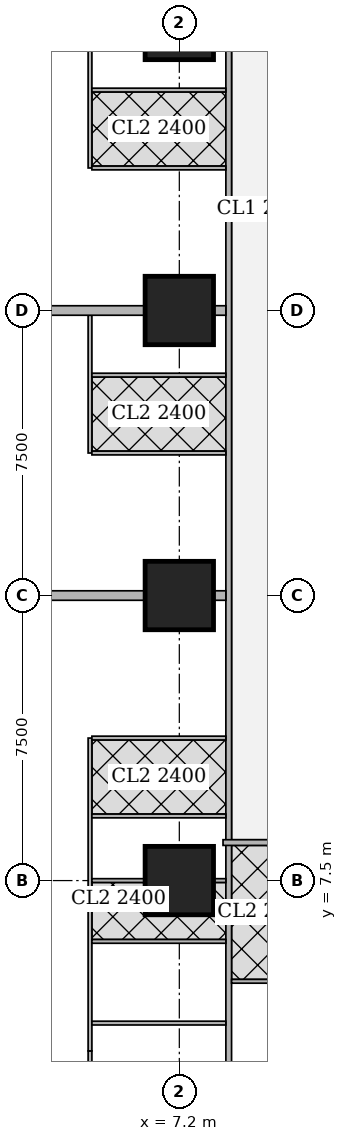
"""IFC4 building model, lengths in metres.
Left out: names, types, materials, properties, quantities, classifications, styles, units other than length and angle.
Written with IfcOpenShell. Run it as: python <this file> out.ifc"""

import sys

from ifc_helpers import new_model, si_unit, direction, frame, frame_2d, origin, origin_2d, place, context, subcontext, project, spatial, rectangle, extrude, element, fill, save


model = new_model("IFC4")
c1 = context("Model", 3, precision=1e-05, world=origin(), true_north=direction((0.0, 1.0)))
c2 = subcontext(c1, "Body", "Model", "MODEL_VIEW")
j1 = project(units=[si_unit("LENGTHUNIT", "METRE"), si_unit("PLANEANGLEUNIT", "RADIAN")], contexts=[c1])
p1 = place(None, origin())
s1 = spatial("IfcSite", under=j1, at=p1, CompositionType="ELEMENT")
p2 = place(p1, origin())
s2 = spatial("IfcBuilding", under=s1, at=p2, CompositionType="ELEMENT")
p3 = place(p2, frame((0.0, 0.0, 42.5)))
s3 = spatial("IfcBuildingStorey", under=s2, at=p3, CompositionType="ELEMENT", Elevation=42.5)
for number, where, z_axis, x_axis in (
    (1, (7.2, 7.5, 0.0), (0.0, 0.0, 1.0), (1.0, 0.0, 0.0)),
    (2, (7.2, 15.0, 0.0), (0.0, 0.0, 1.0), (1.0, 0.0, 0.0)),
    (3, (7.2, 22.5, 0.0), (0.0, 0.0, 1.0), (1.0, 0.0, 0.0)),
    (4, (7.2, 30.0, 0.0), (0.0, 0.0, 1.0), (1.0, 0.0, 0.0)),
):
    element("IfcColumn", number, at=place(p3, frame(where, z_axis=z_axis, x_axis=x_axis)), inside=s3, PredefinedType="COLUMN", context=c2, shape_type="SweptSolid", body=[
        extrude(rectangle(XDim=1.8, YDim=1.8, at=origin_2d()), origin(), (0.0, 0.0, 1.0), 3.75),
    ])
p4 = place(p3, frame((8.5, 2.426, 0.0), z_axis=(0.0, 0.0, 1.0), x_axis=(0.0, 1.0, 0.0)))
e5 = element("IfcWall", 5, at=p4, inside=s3, PredefinedType="SOLIDWALL", context=c2, shape_type="SweptSolid", body=[
    extrude(rectangle(XDim=40.173, YDim=0.15, at=frame_2d((20.086, 0.0))), origin(), (0.0, 0.0, 1.0), 3.5),
])
p5 = place(p4, frame((9.986, 0.0, 0.0)))
e6 = element("IfcOpeningElement", 6, at=p5, cuts=e5, PredefinedType="OPENING", context=c2, shape_type="SweptSolid", body=[
    extrude(rectangle(XDim=1.0, YDim=2.1, at=frame_2d((0.5, 1.05))), frame((0.0, 0.085, 0.0), z_axis=(0.0, -1.0, 0.0), x_axis=(1.0, 0.0, 0.0)), (0.0, 0.0, 1.0), 0.17),
])
p6 = place(p4, frame((14.161, 0.0, 0.0)))
e7 = element("IfcOpeningElement", 7, at=p6, cuts=e5, PredefinedType="OPENING", context=c2, shape_type="SweptSolid", body=[
    extrude(rectangle(XDim=1.0, YDim=2.1, at=frame_2d((0.5, 1.05))), frame((0.0, 0.085, 0.0), z_axis=(0.0, -1.0, 0.0), x_axis=(1.0, 0.0, 0.0)), (0.0, 0.0, 1.0), 0.17),
])
p7 = place(p4, frame((21.662, 0.0, 0.0)))
e8 = element("IfcOpeningElement", 8, at=p7, cuts=e5, PredefinedType="OPENING", context=c2, shape_type="SweptSolid", body=[
    extrude(rectangle(XDim=1.0, YDim=2.1, at=frame_2d((0.5, 1.05))), frame((0.0, 0.085, 0.0), z_axis=(0.0, -1.0, 0.0), x_axis=(1.0, 0.0, 0.0)), (0.0, 0.0, 1.0), 0.17),
])
p8 = place(p4, frame((29.161, 0.0, 0.0)))
e9 = element("IfcOpeningElement", 9, at=p8, cuts=e5, PredefinedType="OPENING", context=c2, shape_type="SweptSolid", body=[
    extrude(rectangle(XDim=1.0, YDim=2.1, at=frame_2d((0.5, 1.05))), frame((0.0, 0.085, 0.0), z_axis=(0.0, -1.0, 0.0), x_axis=(1.0, 0.0, 0.0)), (0.0, 0.0, 1.0), 0.17),
])
p9 = place(p3, frame((40.054, 8.5, 0.0), z_axis=(0.0, 0.0, 1.0), x_axis=(-1.0, 0.0, 0.0)))
e10 = element("IfcWall", 10, at=p9, inside=s3, PredefinedType="SOLIDWALL", context=c2, shape_type="SweptSolid", body=[
    extrude(rectangle(XDim=31.704, YDim=0.15, at=frame_2d((15.852, 0.0))), origin(), (0.0, 0.0, 1.0), 3.5),
])
p10 = place(p9, frame((27.321, 0.0, 0.0)))
e11 = element("IfcOpeningElement", 11, at=p10, cuts=e10, PredefinedType="OPENING", context=c2, shape_type="SweptSolid", body=[
    extrude(rectangle(XDim=1.0, YDim=2.1, at=frame_2d((0.5, 1.05))), frame((0.0, 0.085, 0.0), z_axis=(0.0, -1.0, 0.0), x_axis=(1.0, 0.0, 0.0)), (0.0, 0.0, 1.0), 0.17),
])
p11 = place(p9, frame((23.054, 0.0, 0.0)))
e12 = element("IfcOpeningElement", 12, at=p11, cuts=e10, PredefinedType="OPENING", context=c2, shape_type="SweptSolid", body=[
    extrude(rectangle(XDim=1.0, YDim=2.1, at=frame_2d((0.5, 1.05))), frame((0.0, 0.085, 0.0), z_axis=(0.0, -1.0, 0.0), x_axis=(1.0, 0.0, 0.0)), (0.0, 0.0, 1.0), 0.17),
])
p12 = place(p9, frame((15.854, 0.0, 0.0)))
e13 = element("IfcOpeningElement", 13, at=p12, cuts=e10, PredefinedType="OPENING", context=c2, shape_type="SweptSolid", body=[
    extrude(rectangle(XDim=1.0, YDim=2.1, at=frame_2d((0.5, 1.05))), frame((0.0, 0.085, 0.0), z_axis=(0.0, -1.0, 0.0), x_axis=(1.0, 0.0, 0.0)), (0.0, 0.0, 1.0), 0.17),
])
p13 = place(p9, frame((8.654, 0.0, 0.0)))
e14 = element("IfcOpeningElement", 14, at=p13, cuts=e10, PredefinedType="OPENING", context=c2, shape_type="SweptSolid", body=[
    extrude(rectangle(XDim=1.0, YDim=2.1, at=frame_2d((0.5, 1.05))), frame((0.0, 0.085, 0.0), z_axis=(0.0, -1.0, 0.0), x_axis=(1.0, 0.0, 0.0)), (0.0, 0.0, 1.0), 0.17),
])
p14 = place(p9, frame((0.15, 0.0, 0.0)))
e15 = element("IfcOpeningElement", 15, at=p14, cuts=e10, PredefinedType="OPENING", context=c2, shape_type="SweptSolid", body=[
    extrude(rectangle(XDim=1.0, YDim=2.1, at=frame_2d((0.5, 1.05))), frame((0.0, 0.085, 0.0), z_axis=(0.0, -1.0, 0.0), x_axis=(1.0, 0.0, 0.0)), (0.0, 0.0, 1.0), 0.17),
])
p15 = place(p3, frame((4.85, 0.121, 0.0), z_axis=(0.0, 0.0, 1.0), x_axis=(0.0, 1.0, 0.0)))
e16 = element("IfcWall", 16, at=p15, inside=s3, PredefinedType="PARTITIONING", context=c2, shape_type="SweptSolid", body=[
    extrude(rectangle(XDim=2.897, YDim=0.1, at=frame_2d((1.448, 0.0))), origin(), (0.0, 0.0, 1.0), 2.05),
])
p16 = place(p3, frame((4.85, 3.018, 0.0), z_axis=(0.0, 0.0, 1.0), x_axis=(0.0, 1.0, 0.0)))
e17 = element("IfcWall", 17, at=p16, inside=s3, PredefinedType="PARTITIONING", context=c2, shape_type="SweptSolid", body=[
    extrude(rectangle(XDim=8.232, YDim=0.1, at=frame_2d((4.116, 0.0))), origin(), (0.0, 0.0, 1.0), 3.5),
])
p17 = place(p16, frame((6.757, 0.0, 0.0)))
e18 = element("IfcOpeningElement", 18, at=p17, cuts=e17, PredefinedType="OPENING", context=c2, shape_type="SweptSolid", body=[
    extrude(rectangle(XDim=0.9, YDim=2.1, at=frame_2d((0.45, 1.05))), frame((0.0, 0.06, 0.0), z_axis=(0.0, -1.0, 0.0), x_axis=(1.0, 0.0, 0.0)), (0.0, 0.0, 1.0), 0.12),
])
p18 = place(p16, frame((3.232, 0.0, 0.0)))
e19 = element("IfcOpeningElement", 19, at=p18, cuts=e17, PredefinedType="OPENING", context=c2, shape_type="SweptSolid", body=[
    extrude(rectangle(XDim=0.9, YDim=2.1, at=frame_2d((0.45, 1.05))), frame((0.0, 0.06, 0.0), z_axis=(0.0, -1.0, 0.0), x_axis=(1.0, 0.0, 0.0)), (0.0, 0.0, 1.0), 0.12),
])
p19 = place(p16, frame((4.882, 0.0, 0.0)))
e20 = element("IfcOpeningElement", 20, at=p19, cuts=e17, PredefinedType="OPENING", context=c2, shape_type="SweptSolid", body=[
    extrude(rectangle(XDim=0.9, YDim=2.1, at=frame_2d((0.45, 1.05))), frame((0.0, 0.06, 0.0), z_axis=(0.0, -1.0, 0.0), x_axis=(1.0, 0.0, 0.0)), (0.0, 0.0, 1.0), 0.12),
])
p20 = place(p16, frame((1.357, 0.0, 0.0)))
e21 = element("IfcOpeningElement", 21, at=p20, cuts=e17, PredefinedType="OPENING", context=c2, shape_type="SweptSolid", body=[
    extrude(rectangle(XDim=0.9, YDim=2.1, at=frame_2d((0.45, 1.05))), frame((0.0, 0.06, 0.0), z_axis=(0.0, -1.0, 0.0), x_axis=(1.0, 0.0, 0.0)), (0.0, 0.0, 1.0), 0.12),
])
p21 = place(p3, frame((4.9, 3.75, 0.0), z_axis=(0.0, 0.0, 1.0), x_axis=(1.0, 0.0, 0.0)))
e22 = element("IfcWall", 22, at=p21, inside=s3, PredefinedType="PARTITIONING", context=c2, shape_type="SweptSolid", body=[
    extrude(rectangle(XDim=3.525, YDim=0.1, at=frame_2d((1.763, 0.0))), origin(), (0.0, 0.0, 1.0), 3.5),
])
p22 = place(p3, frame((4.9, 7.5, 0.0), z_axis=(0.0, 0.0, 1.0), x_axis=(1.0, 0.0, 0.0)))
e23 = element("IfcWall", 23, at=p22, inside=s3, PredefinedType="PARTITIONING", context=c2, shape_type="SweptSolid", body=[
    extrude(rectangle(XDim=1.399, YDim=0.1, at=frame_2d((0.7, 0.0))), origin(), (0.0, 0.0, 1.0), 3.5),
])
p23 = place(p3, frame((8.101, 7.5, 0.0), z_axis=(0.0, 0.0, 1.0), x_axis=(1.0, 0.0, 0.0)))
e24 = element("IfcWall", 24, at=p23, inside=s3, PredefinedType="PARTITIONING", context=c2, shape_type="SweptSolid", body=[
    extrude(rectangle(XDim=0.324, YDim=0.1, at=frame_2d((0.162, 0.0))), origin(), (0.0, 0.0, 1.0), 3.5),
])
for number, where, z_axis, x_axis in (
    (25, (4.9, 11.25, 0.0), (0.0, 0.0, 1.0), (1.0, 0.0, 0.0)),
    (26, (4.9, 9.2, 0.0), (0.0, 0.0, 1.0), (1.0, 0.0, 0.0)),
    (27, (4.9, 5.9, 0.0), (0.0, 0.0, 1.0), (1.0, 0.0, 0.0)),
):
    element("IfcWall", number, at=place(p3, frame(where, z_axis=z_axis, x_axis=x_axis)), inside=s3, PredefinedType="PARTITIONING", context=c2, shape_type="SweptSolid", body=[
        extrude(rectangle(XDim=3.525, YDim=0.1, at=frame_2d((1.763, 0.0))), origin(), (0.0, 0.0, 1.0), 3.5),
    ])
p24 = place(p3, frame((4.85, 18.75, 0.0), z_axis=(0.0, 0.0, 1.0), x_axis=(0.0, 1.0, 0.0)))
e28 = element("IfcWall", 28, at=p24, inside=s3, PredefinedType="PARTITIONING", context=c2, shape_type="SweptSolid", body=[
    extrude(rectangle(XDim=3.625, YDim=0.1, at=frame_2d((1.812, 0.0))), origin(), (0.0, 0.0, 1.0), 3.5),
])
p25 = place(p24, frame((0.575, 0.0, 0.0)))
e29 = element("IfcOpeningElement", 29, at=p25, cuts=e28, PredefinedType="OPENING", context=c2, shape_type="SweptSolid", body=[
    extrude(rectangle(XDim=0.9, YDim=2.1, at=frame_2d((0.45, 1.05))), frame((0.0, 0.06, 0.0), z_axis=(0.0, -1.0, 0.0), x_axis=(1.0, 0.0, 0.0)), (0.0, 0.0, 1.0), 0.12),
])
p26 = place(p24, frame((2.45, 0.0, 0.0)))
e30 = element("IfcOpeningElement", 30, at=p26, cuts=e28, PredefinedType="OPENING", context=c2, shape_type="SweptSolid", body=[
    extrude(rectangle(XDim=0.9, YDim=2.1, at=frame_2d((0.45, 1.05))), frame((0.0, 0.06, 0.0), z_axis=(0.0, -1.0, 0.0), x_axis=(1.0, 0.0, 0.0)), (0.0, 0.0, 1.0), 0.12),
])
for number, where, z_axis, x_axis in (
    (31, (4.9, 18.75, 0.0), (0.0, 0.0, 1.0), (1.0, 0.0, 0.0)),
    (32, (4.9, 20.8, 0.0), (0.0, 0.0, 1.0), (1.0, 0.0, 0.0)),
):
    element("IfcWall", number, at=place(p3, frame(where, z_axis=z_axis, x_axis=x_axis)), inside=s3, PredefinedType="PARTITIONING", context=c2, shape_type="SweptSolid", body=[
        extrude(rectangle(XDim=3.525, YDim=0.1, at=frame_2d((1.763, 0.0))), origin(), (0.0, 0.0, 1.0), 3.5),
    ])
p27 = place(p3, frame((3.65, 15.0, 0.0), z_axis=(0.0, 0.0, 1.0), x_axis=(1.0, 0.0, 0.0)))
e33 = element("IfcWall", 33, at=p27, inside=s3, PredefinedType="SOLIDWALL", context=c2, shape_type="SweptSolid", body=[
    extrude(rectangle(XDim=2.649, YDim=0.25, at=frame_2d((1.325, 0.0))), origin(), (0.0, 0.0, 1.0), 3.5),
])
p28 = place(p3, frame((8.101, 15.0, 0.0), z_axis=(0.0, 0.0, 1.0), x_axis=(1.0, 0.0, 0.0)))
e34 = element("IfcWall", 34, at=p28, inside=s3, PredefinedType="SOLIDWALL", context=c2, shape_type="SweptSolid", body=[
    extrude(rectangle(XDim=0.324, YDim=0.25, at=frame_2d((0.162, 0.0))), origin(), (0.0, 0.0, 1.0), 3.5),
])
p29 = place(p3, frame((4.85, 26.25, 0.0), z_axis=(0.0, 0.0, 1.0), x_axis=(0.0, 1.0, 0.0)))
e35 = element("IfcWall", 35, at=p29, inside=s3, PredefinedType="PARTITIONING", context=c2, shape_type="SweptSolid", body=[
    extrude(rectangle(XDim=3.625, YDim=0.1, at=frame_2d((1.812, 0.0))), origin(), (0.0, 0.0, 1.0), 3.5),
])
p30 = place(p29, frame((0.575, 0.0, 0.0)))
e36 = element("IfcOpeningElement", 36, at=p30, cuts=e35, PredefinedType="OPENING", context=c2, shape_type="SweptSolid", body=[
    extrude(rectangle(XDim=0.9, YDim=2.1, at=frame_2d((0.45, 1.05))), frame((0.0, 0.06, 0.0), z_axis=(0.0, -1.0, 0.0), x_axis=(1.0, 0.0, 0.0)), (0.0, 0.0, 1.0), 0.12),
])
p31 = place(p29, frame((2.45, 0.0, 0.0)))
e37 = element("IfcOpeningElement", 37, at=p31, cuts=e35, PredefinedType="OPENING", context=c2, shape_type="SweptSolid", body=[
    extrude(rectangle(XDim=0.9, YDim=2.1, at=frame_2d((0.45, 1.05))), frame((0.0, 0.06, 0.0), z_axis=(0.0, -1.0, 0.0), x_axis=(1.0, 0.0, 0.0)), (0.0, 0.0, 1.0), 0.12),
])
for number, where, z_axis, x_axis in (
    (38, (4.9, 26.25, 0.0), (0.0, 0.0, 1.0), (1.0, 0.0, 0.0)),
    (39, (4.9, 28.3, 0.0), (0.0, 0.0, 1.0), (1.0, 0.0, 0.0)),
):
    element("IfcWall", number, at=place(p3, frame(where, z_axis=z_axis, x_axis=x_axis)), inside=s3, PredefinedType="PARTITIONING", context=c2, shape_type="SweptSolid", body=[
        extrude(rectangle(XDim=3.525, YDim=0.1, at=frame_2d((1.763, 0.0))), origin(), (0.0, 0.0, 1.0), 3.5),
    ])
p32 = place(p3, frame((3.65, 22.5, 0.0), z_axis=(0.0, 0.0, 1.0), x_axis=(1.0, 0.0, 0.0)))
e40 = element("IfcWall", 40, at=p32, inside=s3, PredefinedType="SOLIDWALL", context=c2, shape_type="SweptSolid", body=[
    extrude(rectangle(XDim=2.649, YDim=0.25, at=frame_2d((1.325, 0.0))), origin(), (0.0, 0.0, 1.0), 3.5),
])
p33 = place(p3, frame((8.101, 22.5, 0.0), z_axis=(0.0, 0.0, 1.0), x_axis=(1.0, 0.0, 0.0)))
e41 = element("IfcWall", 41, at=p33, inside=s3, PredefinedType="SOLIDWALL", context=c2, shape_type="SweptSolid", body=[
    extrude(rectangle(XDim=0.324, YDim=0.25, at=frame_2d((0.162, 0.0))), origin(), (0.0, 0.0, 1.0), 3.5),
])
p34 = place(p3, frame((10.39, 4.85, 0.0), z_axis=(0.0, 0.0, 1.0), x_axis=(-1.0, 0.0, 0.0)))
e42 = element("IfcWall", 42, at=p34, inside=s3, PredefinedType="PARTITIONING", context=c2, shape_type="SweptSolid", body=[
    extrude(rectangle(XDim=1.815, YDim=0.1, at=frame_2d((0.907, 0.0))), origin(), (0.0, 0.0, 1.0), 3.5),
])
p35 = place(p34, frame((0.49, 0.0, 0.0)))
e43 = element("IfcOpeningElement", 43, at=p35, cuts=e42, PredefinedType="OPENING", context=c2, shape_type="SweptSolid", body=[
    extrude(rectangle(XDim=0.9, YDim=2.1, at=frame_2d((0.45, 1.05))), frame((0.0, 0.06, 0.0), z_axis=(0.0, -1.0, 0.0), x_axis=(1.0, 0.0, 0.0)), (0.0, 0.0, 1.0), 0.12),
])
p36 = place(p17, origin())
e44 = element("IfcDoor", 44, at=p36, inside=s3, OperationType="SINGLE_SWING_LEFT", PredefinedType="DOOR", context=c2, shape_type="SweptSolid", body=[
    extrude(rectangle(XDim=0.9, YDim=2.1, at=frame_2d((0.45, 1.05))), frame((0.0, 0.025, 0.0), z_axis=(0.0, -1.0, 0.0), x_axis=(1.0, 0.0, 0.0)), (0.0, 0.0, 1.0), 0.05),
])
fill(e18, e44)
p37 = place(p18, origin())
e45 = element("IfcDoor", 45, at=p37, inside=s3, OperationType="SINGLE_SWING_LEFT", PredefinedType="DOOR", context=c2, shape_type="SweptSolid", body=[
    extrude(rectangle(XDim=0.9, YDim=2.1, at=frame_2d((0.45, 1.05))), frame((0.0, 0.025, 0.0), z_axis=(0.0, -1.0, 0.0), x_axis=(1.0, 0.0, 0.0)), (0.0, 0.0, 1.0), 0.05),
])
fill(e19, e45)
p38 = place(p19, origin())
e46 = element("IfcDoor", 46, at=p38, inside=s3, OperationType="SINGLE_SWING_LEFT", PredefinedType="DOOR", context=c2, shape_type="SweptSolid", body=[
    extrude(rectangle(XDim=0.9, YDim=2.1, at=frame_2d((0.45, 1.05))), frame((0.0, 0.025, 0.0), z_axis=(0.0, -1.0, 0.0), x_axis=(1.0, 0.0, 0.0)), (0.0, 0.0, 1.0), 0.05),
])
fill(e20, e46)
p39 = place(p20, origin())
e47 = element("IfcDoor", 47, at=p39, inside=s3, OperationType="SINGLE_SWING_RIGHT", PredefinedType="DOOR", context=c2, shape_type="SweptSolid", body=[
    extrude(rectangle(XDim=0.9, YDim=2.1, at=frame_2d((0.45, 1.05))), frame((0.0, 0.025, 0.0), z_axis=(0.0, -1.0, 0.0), x_axis=(1.0, 0.0, 0.0)), (0.0, 0.0, 1.0), 0.05),
])
fill(e21, e47)
p40 = place(p5, origin())
e48 = element("IfcDoor", 48, at=p40, inside=s3, OperationType="SINGLE_SWING_LEFT", PredefinedType="DOOR", context=c2, shape_type="SweptSolid", body=[
    extrude(rectangle(XDim=1.0, YDim=2.1, at=frame_2d((0.5, 1.05))), frame((0.0, 0.025, 0.0), z_axis=(0.0, -1.0, 0.0), x_axis=(1.0, 0.0, 0.0)), (0.0, 0.0, 1.0), 0.05),
])
fill(e6, e48)
p41 = place(p25, origin())
e49 = element("IfcDoor", 49, at=p41, inside=s3, OperationType="SINGLE_SWING_RIGHT", PredefinedType="DOOR", context=c2, shape_type="SweptSolid", body=[
    extrude(rectangle(XDim=0.9, YDim=2.1, at=frame_2d((0.45, 1.05))), frame((0.0, 0.025, 0.0), z_axis=(0.0, -1.0, 0.0), x_axis=(1.0, 0.0, 0.0)), (0.0, 0.0, 1.0), 0.05),
])
fill(e29, e49)
p42 = place(p26, origin())
e50 = element("IfcDoor", 50, at=p42, inside=s3, OperationType="SINGLE_SWING_LEFT", PredefinedType="DOOR", context=c2, shape_type="SweptSolid", body=[
    extrude(rectangle(XDim=0.9, YDim=2.1, at=frame_2d((0.45, 1.05))), frame((0.0, 0.025, 0.0), z_axis=(0.0, -1.0, 0.0), x_axis=(1.0, 0.0, 0.0)), (0.0, 0.0, 1.0), 0.05),
])
fill(e30, e50)
p43 = place(p6, origin())
e51 = element("IfcDoor", 51, at=p43, inside=s3, OperationType="SINGLE_SWING_RIGHT", PredefinedType="DOOR", context=c2, shape_type="SweptSolid", body=[
    extrude(rectangle(XDim=1.0, YDim=2.1, at=frame_2d((0.5, 1.05))), frame((0.0, 0.025, 0.0), z_axis=(0.0, -1.0, 0.0), x_axis=(1.0, 0.0, 0.0)), (0.0, 0.0, 1.0), 0.05),
])
fill(e7, e51)
p44 = place(p30, origin())
e52 = element("IfcDoor", 52, at=p44, inside=s3, OperationType="SINGLE_SWING_RIGHT", PredefinedType="DOOR", context=c2, shape_type="SweptSolid", body=[
    extrude(rectangle(XDim=0.9, YDim=2.1, at=frame_2d((0.45, 1.05))), frame((0.0, 0.025, 0.0), z_axis=(0.0, -1.0, 0.0), x_axis=(1.0, 0.0, 0.0)), (0.0, 0.0, 1.0), 0.05),
])
fill(e36, e52)
p45 = place(p31, origin())
e53 = element("IfcDoor", 53, at=p45, inside=s3, OperationType="SINGLE_SWING_LEFT", PredefinedType="DOOR", context=c2, shape_type="SweptSolid", body=[
    extrude(rectangle(XDim=0.9, YDim=2.1, at=frame_2d((0.45, 1.05))), frame((0.0, 0.025, 0.0), z_axis=(0.0, -1.0, 0.0), x_axis=(1.0, 0.0, 0.0)), (0.0, 0.0, 1.0), 0.05),
])
fill(e37, e53)
p46 = place(p7, origin())
e54 = element("IfcDoor", 54, at=p46, inside=s3, OperationType="SINGLE_SWING_RIGHT", PredefinedType="DOOR", context=c2, shape_type="SweptSolid", body=[
    extrude(rectangle(XDim=1.0, YDim=2.1, at=frame_2d((0.5, 1.05))), frame((0.0, 0.025, 0.0), z_axis=(0.0, -1.0, 0.0), x_axis=(1.0, 0.0, 0.0)), (0.0, 0.0, 1.0), 0.05),
])
fill(e8, e54)
p47 = place(p35, origin())
e55 = element("IfcDoor", 55, at=p47, inside=s3, OperationType="SINGLE_SWING_LEFT", PredefinedType="DOOR", context=c2, shape_type="SweptSolid", body=[
    extrude(rectangle(XDim=0.9, YDim=2.1, at=frame_2d((0.45, 1.05))), frame((0.0, 0.025, 0.0), z_axis=(0.0, -1.0, 0.0), x_axis=(1.0, 0.0, 0.0)), (0.0, 0.0, 1.0), 0.05),
])
fill(e43, e55)
save(model, sys.argv[1])
